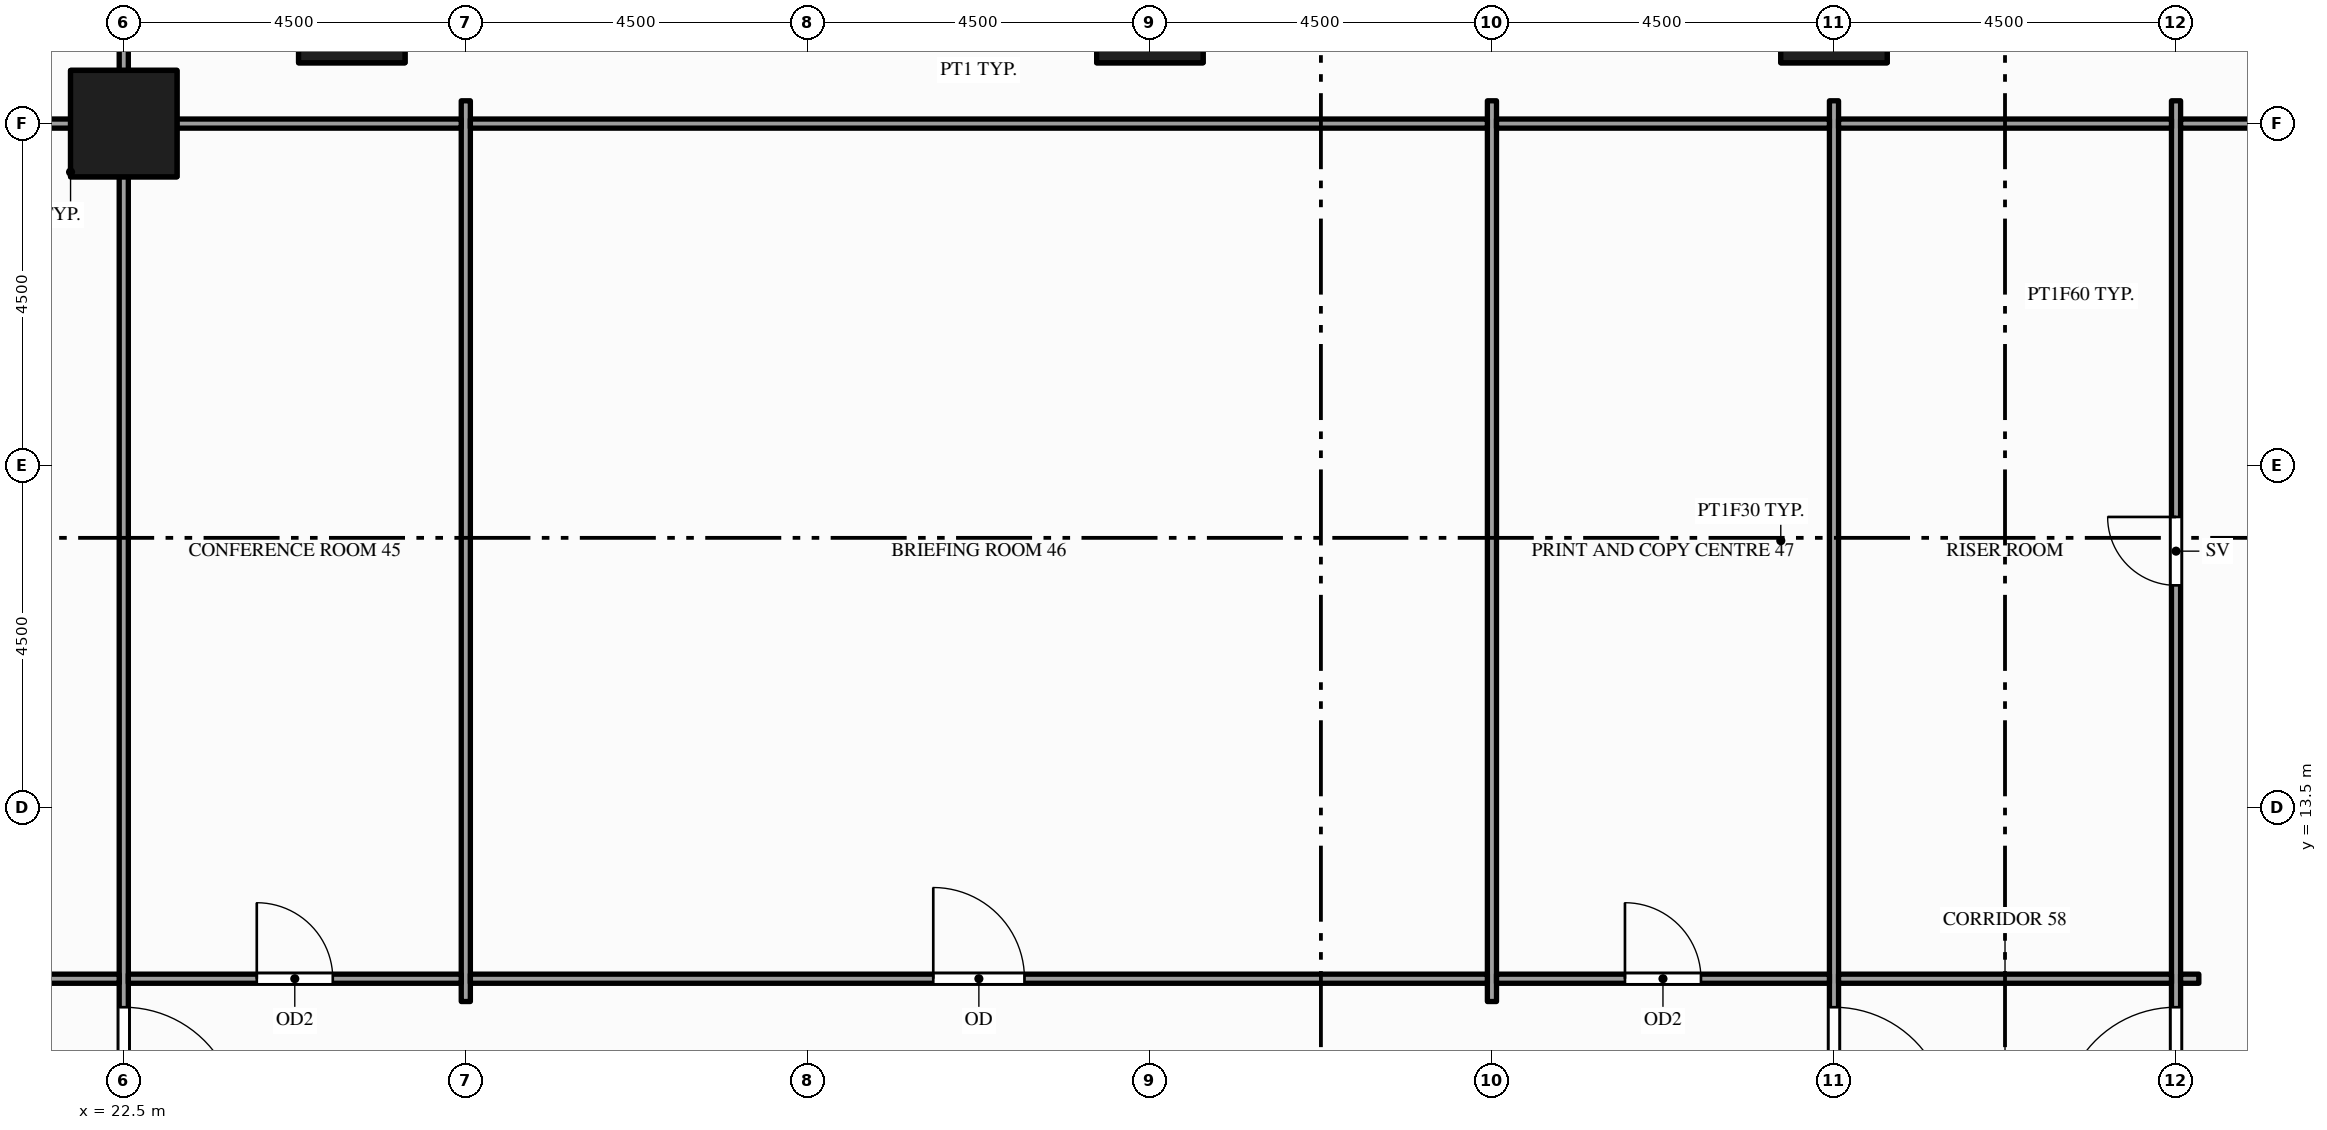
"""IFC4 building model, lengths in metres.
Left out: names, types, materials, properties, quantities, classifications, styles, units other than length and angle.
Written with IfcOpenShell. Run it as: python <this file> out.ifc"""

import sys

from ifc_helpers import new_model, si_unit, direction, frame, frame_2d, origin, origin_2d, place, context, subcontext, project, spatial, rectangle, hollow_rectangle, extrude, element, fill, save


model = new_model("IFC4")
c1 = context("Model", 3, precision=1e-05, world=origin(), true_north=direction((0.0, 1.0)))
c2 = subcontext(c1, "Body", "Model", "MODEL_VIEW")
j1 = project(units=[si_unit("LENGTHUNIT", "METRE"), si_unit("PLANEANGLEUNIT", "RADIAN")], contexts=[c1])
p1 = place(None, origin())
s1 = spatial("IfcSite", under=j1, at=p1, CompositionType="ELEMENT")
p2 = place(p1, origin())
s2 = spatial("IfcBuilding", under=s1, at=p2, CompositionType="ELEMENT")
p3 = place(p2, frame((0.0, 0.0, 24.0)))
s3 = spatial("IfcBuildingStorey", under=s2, at=p3, CompositionType="ELEMENT", Elevation=24.0)
p4 = place(p3, frame((22.5, 22.5, -0.25), z_axis=(0.0, 0.0, 1.0), x_axis=(1.0, 0.0, 0.0)))
e1 = element("IfcColumn", 1, at=p4, inside=s3, PredefinedType="COLUMN", context=c2, shape_type="SweptSolid", body=[
    extrude(hollow_rectangle(XDim=1.4, YDim=1.4, WallThickness=0.08, at=origin_2d()), origin(), (0.0, 0.0, 1.0), 3.6),
])
p5 = place(p3, frame((22.5, 22.5, 3.35), z_axis=(0.0, 0.0, 1.0), x_axis=(1.0, 0.0, 0.0)))
e2 = element("IfcColumn", 2, at=p5, inside=s3, PredefinedType="COLUMN", context=c2, shape_type="SweptSolid", body=[
    extrude(rectangle(XDim=1.4, YDim=1.4, at=origin_2d()), origin(), (0.0, 0.0, 1.0), 1.5),
])
p6 = place(p3, frame((25.5, 24.0, -0.25), z_axis=(0.0, 0.0, 1.0), x_axis=(1.0, 0.0, 0.0)))
e3 = element("IfcColumn", 3, at=p6, inside=s3, PredefinedType="COLUMN", context=c2, shape_type="SweptSolid", body=[
    extrude(hollow_rectangle(XDim=1.4, YDim=1.4, WallThickness=0.08, at=origin_2d()), origin(), (0.0, 0.0, 1.0), 3.45),
])
p7 = place(p3, frame((25.5, 24.0, 3.2), z_axis=(0.0, 0.0, 1.0), x_axis=(1.0, 0.0, 0.0)))
e4 = element("IfcColumn", 4, at=p7, inside=s3, PredefinedType="COLUMN", context=c2, shape_type="SweptSolid", body=[
    extrude(rectangle(XDim=1.4, YDim=1.4, at=origin_2d()), origin(), (0.0, 0.0, 1.0), 1.5),
])
p8 = place(p3, frame((36.0, 24.0, -0.25), z_axis=(0.0, 0.0, 1.0), x_axis=(1.0, 0.0, 0.0)))
e5 = element("IfcColumn", 5, at=p8, inside=s3, PredefinedType="COLUMN", context=c2, shape_type="SweptSolid", body=[
    extrude(hollow_rectangle(XDim=1.4, YDim=1.4, WallThickness=0.08, at=origin_2d()), origin(), (0.0, 0.0, 1.0), 3.45),
])
p9 = place(p3, frame((36.0, 24.0, 3.2), z_axis=(0.0, 0.0, 1.0), x_axis=(1.0, 0.0, 0.0)))
e6 = element("IfcColumn", 6, at=p9, inside=s3, PredefinedType="COLUMN", context=c2, shape_type="SweptSolid", body=[
    extrude(rectangle(XDim=1.4, YDim=1.4, at=origin_2d()), origin(), (0.0, 0.0, 1.0), 1.5),
])
p10 = place(p3, frame((45.0, 24.0, -0.25), z_axis=(0.0, 0.0, 1.0), x_axis=(1.0, 0.0, 0.0)))
e7 = element("IfcColumn", 7, at=p10, inside=s3, PredefinedType="COLUMN", context=c2, shape_type="SweptSolid", body=[
    extrude(hollow_rectangle(XDim=1.4, YDim=1.4, WallThickness=0.08, at=origin_2d()), origin(), (0.0, 0.0, 1.0), 3.45),
])
p11 = place(p3, frame((45.0, 24.0, 3.2), z_axis=(0.0, 0.0, 1.0), x_axis=(1.0, 0.0, 0.0)))
e8 = element("IfcColumn", 8, at=p11, inside=s3, PredefinedType="COLUMN", context=c2, shape_type="SweptSolid", body=[
    extrude(rectangle(XDim=1.4, YDim=1.4, at=origin_2d()), origin(), (0.0, 0.0, 1.0), 1.5),
])
p12 = place(p3, frame((22.5, 0.15, 0.0), z_axis=(0.0, 0.0, 1.0), x_axis=(0.0, 1.0, 0.0)))
e9 = element("IfcWall", 9, at=p12, inside=s3, PredefinedType="PARTITIONING", context=c2, shape_type="SweptSolid", body=[
    extrude(rectangle(XDim=35.95, YDim=0.12, at=frame_2d((17.975, 0.0))), origin(), (0.0, 0.0, 1.0), 3.3),
])
p13 = place(p12, frame((9.225, 0.0, 0.0)))
e10 = element("IfcOpeningElement", 10, at=p13, cuts=e9, PredefinedType="OPENING", context=c2, shape_type="SweptSolid", body=[
    extrude(rectangle(XDim=1.5, YDim=2.1, at=frame_2d((0.75, 1.05))), frame((0.0, 0.07, 0.0), z_axis=(0.0, -1.0, 0.0), x_axis=(1.0, 0.0, 0.0)), (0.0, 0.0, 1.0), 0.14),
])
p14 = place(p12, frame((32.7, 0.0, 0.0)))
e11 = element("IfcOpeningElement", 11, at=p14, cuts=e9, PredefinedType="OPENING", context=c2, shape_type="SweptSolid", body=[
    extrude(rectangle(XDim=1.8, YDim=2.1, at=frame_2d((0.9, 1.05))), frame((0.0, 0.07, 0.0), z_axis=(0.0, -1.0, 0.0), x_axis=(1.0, 0.0, 0.0)), (0.0, 0.0, 1.0), 0.14),
])
for number, where, z_axis, x_axis in (
    (12, (27.0, 10.95, 0.0), (0.0, 0.0, 1.0), (0.0, 1.0, 0.0)),
    (13, (40.5, 10.95, 0.0), (0.0, 0.0, 1.0), (0.0, 1.0, 0.0)),
):
    element("IfcWall", number, at=place(p3, frame(where, z_axis=z_axis, x_axis=x_axis)), inside=s3, PredefinedType="PARTITIONING", context=c2, shape_type="SweptSolid", body=[
        extrude(rectangle(XDim=11.85, YDim=0.12, at=frame_2d((5.925, 0.0))), origin(), (0.0, 0.0, 1.0), 3.938),
    ])
p15 = place(p3, frame((45.0, 0.15, 0.0), z_axis=(0.0, 0.0, 1.0), x_axis=(0.0, 1.0, 0.0)))
e14 = element("IfcWall", 14, at=p15, inside=s3, PredefinedType="PARTITIONING", context=c2, shape_type="SweptSolid", body=[
    extrude(rectangle(XDim=22.65, YDim=0.12, at=frame_2d((11.325, 0.0))), origin(), (0.0, 0.0, 1.0), 3.3),
])
p16 = place(p15, frame((9.225, 0.0, 0.0)))
e15 = element("IfcOpeningElement", 15, at=p16, cuts=e14, PredefinedType="OPENING", context=c2, shape_type="SweptSolid", body=[
    extrude(rectangle(XDim=1.5, YDim=2.1, at=frame_2d((0.75, 1.05))), frame((0.0, 0.07, 0.0), z_axis=(0.0, -1.0, 0.0), x_axis=(1.0, 0.0, 0.0)), (0.0, 0.0, 1.0), 0.14),
])
p17 = place(p3, frame((49.5, 0.15, 0.0), z_axis=(0.0, 0.0, 1.0), x_axis=(0.0, 1.0, 0.0)))
e16 = element("IfcWall", 16, at=p17, inside=s3, PredefinedType="PARTITIONING", context=c2, shape_type="SweptSolid", body=[
    extrude(rectangle(XDim=22.65, YDim=0.12, at=frame_2d((11.325, 0.0))), origin(), (0.0, 0.0, 1.0), 3.3),
])
p18 = place(p17, frame((0.955, 0.0, 0.0)))
e17 = element("IfcOpeningElement", 17, at=p18, cuts=e16, PredefinedType="OPENING", context=c2, shape_type="SweptSolid", body=[
    extrude(rectangle(XDim=0.9, YDim=2.1, at=frame_2d((0.45, 1.05))), frame((0.0, 0.07, 0.0), z_axis=(0.0, -1.0, 0.0), x_axis=(1.0, 0.0, 0.0)), (0.0, 0.0, 1.0), 0.14),
])
p19 = place(p17, frame((3.9, 0.0, 0.0)))
e18 = element("IfcOpeningElement", 18, at=p19, cuts=e16, PredefinedType="OPENING", context=c2, shape_type="SweptSolid", body=[
    extrude(rectangle(XDim=0.9, YDim=2.1, at=frame_2d((0.45, 1.05))), frame((0.0, 0.07, 0.0), z_axis=(0.0, -1.0, 0.0), x_axis=(1.0, 0.0, 0.0)), (0.0, 0.0, 1.0), 0.14),
])
p20 = place(p17, frame((6.85, 0.0, 0.0)))
e19 = element("IfcOpeningElement", 19, at=p20, cuts=e16, PredefinedType="OPENING", context=c2, shape_type="SweptSolid", body=[
    extrude(rectangle(XDim=1.0, YDim=2.1, at=frame_2d((0.5, 1.05))), frame((0.0, 0.07, 0.0), z_axis=(0.0, -1.0, 0.0), x_axis=(1.0, 0.0, 0.0)), (0.0, 0.0, 1.0), 0.14),
])
p21 = place(p17, frame((16.275, 0.0, 0.0)))
e20 = element("IfcOpeningElement", 20, at=p21, cuts=e16, PredefinedType="OPENING", context=c2, shape_type="SweptSolid", body=[
    extrude(rectangle(XDim=0.9, YDim=2.1, at=frame_2d((0.45, 1.05))), frame((0.0, 0.07, 0.0), z_axis=(0.0, -1.0, 0.0), x_axis=(1.0, 0.0, 0.0)), (0.0, 0.0, 1.0), 0.14),
])
p22 = place(p17, frame((9.225, 0.0, 0.0)))
e21 = element("IfcOpeningElement", 21, at=p22, cuts=e16, PredefinedType="OPENING", context=c2, shape_type="SweptSolid", body=[
    extrude(rectangle(XDim=1.5, YDim=2.1, at=frame_2d((0.75, 1.05))), frame((0.0, 0.07, 0.0), z_axis=(0.0, -1.0, 0.0), x_axis=(1.0, 0.0, 0.0)), (0.0, 0.0, 1.0), 0.14),
])
p23 = place(p3, frame((11.31, 11.25, 0.0), z_axis=(0.0, 0.0, 1.0), x_axis=(1.0, 0.0, 0.0)))
e22 = element("IfcWall", 22, at=p23, inside=s3, PredefinedType="PARTITIONING", context=c2, shape_type="SweptSolid", body=[
    extrude(rectangle(XDim=11.13, YDim=0.12, at=frame_2d((5.565, 0.0))), origin(), (0.0, 0.0, 1.0), 3.938),
])
p24 = place(p3, frame((22.56, 11.25, 0.0), z_axis=(0.0, 0.0, 1.0), x_axis=(1.0, 0.0, 0.0)))
e23 = element("IfcWall", 23, at=p24, inside=s3, PredefinedType="PARTITIONING", context=c2, shape_type="SweptSolid", body=[
    extrude(rectangle(XDim=4.38, YDim=0.12, at=frame_2d((2.19, 0.0))), origin(), (0.0, 0.0, 1.0), 3.788),
])
p25 = place(p24, frame((1.69, 0.0, 0.0)))
e24 = element("IfcOpeningElement", 24, at=p25, cuts=e23, PredefinedType="OPENING", context=c2, shape_type="SweptSolid", body=[
    extrude(rectangle(XDim=1.0, YDim=2.1, at=frame_2d((0.5, 1.05))), frame((0.0, 0.07, 0.0), z_axis=(0.0, -1.0, 0.0), x_axis=(1.0, 0.0, 0.0)), (0.0, 0.0, 1.0), 0.14),
])
p26 = place(p3, frame((27.06, 11.25, 0.0), z_axis=(0.0, 0.0, 1.0), x_axis=(1.0, 0.0, 0.0)))
e25 = element("IfcWall", 25, at=p26, inside=s3, PredefinedType="PARTITIONING", context=c2, shape_type="SweptSolid", body=[
    extrude(rectangle(XDim=13.38, YDim=0.12, at=frame_2d((6.69, 0.0))), origin(), (0.0, 0.0, 1.0), 3.938),
])
p27 = place(p26, frame((6.09, 0.0, 0.0)))
e26 = element("IfcOpeningElement", 26, at=p27, cuts=e25, PredefinedType="OPENING", context=c2, shape_type="SweptSolid", body=[
    extrude(rectangle(XDim=1.2, YDim=2.1, at=frame_2d((0.6, 1.05))), frame((0.0, 0.07, 0.0), z_axis=(0.0, -1.0, 0.0), x_axis=(1.0, 0.0, 0.0)), (0.0, 0.0, 1.0), 0.14),
])
p28 = place(p3, frame((40.56, 11.25, 0.0), z_axis=(0.0, 0.0, 1.0), x_axis=(1.0, 0.0, 0.0)))
e27 = element("IfcWall", 27, at=p28, inside=s3, PredefinedType="PARTITIONING", context=c2, shape_type="SweptSolid", body=[
    extrude(rectangle(XDim=4.38, YDim=0.12, at=frame_2d((2.19, 0.0))), origin(), (0.0, 0.0, 1.0), 3.938),
])
p29 = place(p28, frame((1.69, 0.0, 0.0)))
e28 = element("IfcOpeningElement", 28, at=p29, cuts=e27, PredefinedType="OPENING", context=c2, shape_type="SweptSolid", body=[
    extrude(rectangle(XDim=1.0, YDim=2.1, at=frame_2d((0.5, 1.05))), frame((0.0, 0.07, 0.0), z_axis=(0.0, -1.0, 0.0), x_axis=(1.0, 0.0, 0.0)), (0.0, 0.0, 1.0), 0.14),
])
p30 = place(p3, frame((45.06, 11.25, 0.0), z_axis=(0.0, 0.0, 1.0), x_axis=(1.0, 0.0, 0.0)))
e29 = element("IfcWall", 29, at=p30, inside=s3, PredefinedType="PARTITIONING", context=c2, shape_type="SweptSolid", body=[
    extrude(rectangle(XDim=4.38, YDim=0.12, at=frame_2d((2.19, 0.0))), origin(), (0.0, 0.0, 1.0), 3.938),
])
p31 = place(p3, frame((49.56, 11.25, 0.0), z_axis=(0.0, 0.0, 1.0), x_axis=(1.0, 0.0, 0.0)))
e30 = element("IfcWall", 30, at=p31, inside=s3, PredefinedType="PARTITIONING", context=c2, shape_type="SweptSolid", body=[
    extrude(rectangle(XDim=0.24, YDim=0.12, at=frame_2d((0.12, 0.0))), origin(), (0.0, 0.0, 1.0), 3.938),
])
p32 = place(p3, frame((11.31, 22.5, 0.0), z_axis=(0.0, 0.0, 1.0), x_axis=(1.0, 0.0, 0.0)))
e31 = element("IfcWall", 31, at=p32, inside=s3, PredefinedType="PARTITIONING", context=c2, shape_type="SweptSolid", body=[
    extrude(rectangle(XDim=11.13, YDim=0.12, at=frame_2d((5.565, 0.0))), origin(), (0.0, 0.0, 1.0), 3.6),
])
p33 = place(p3, frame((22.56, 22.5, 0.0), z_axis=(0.0, 0.0, 1.0), x_axis=(1.0, 0.0, 0.0)))
e32 = element("IfcWall", 32, at=p33, inside=s3, PredefinedType="PARTITIONING", context=c2, shape_type="SweptSolid", body=[
    extrude(rectangle(XDim=4.38, YDim=0.12, at=frame_2d((2.19, 0.0))), origin(), (0.0, 0.0, 1.0), 3.788),
])
p34 = place(p3, frame((27.06, 22.5, 0.0), z_axis=(0.0, 0.0, 1.0), x_axis=(1.0, 0.0, 0.0)))
e33 = element("IfcWall", 33, at=p34, inside=s3, PredefinedType="PARTITIONING", context=c2, shape_type="SweptSolid", body=[
    extrude(rectangle(XDim=13.38, YDim=0.12, at=frame_2d((6.69, 0.0))), origin(), (0.0, 0.0, 1.0), 3.938),
])
for number, where, z_axis, x_axis in (
    (34, (40.56, 22.5, 0.0), (0.0, 0.0, 1.0), (1.0, 0.0, 0.0)),
    (35, (45.06, 22.5, 0.0), (0.0, 0.0, 1.0), (1.0, 0.0, 0.0)),
):
    element("IfcWall", number, at=place(p3, frame(where, z_axis=z_axis, x_axis=x_axis)), inside=s3, PredefinedType="PARTITIONING", context=c2, shape_type="SweptSolid", body=[
        extrude(rectangle(XDim=4.38, YDim=0.12, at=frame_2d((2.19, 0.0))), origin(), (0.0, 0.0, 1.0), 3.938),
    ])
p35 = place(p3, frame((49.56, 22.5, 0.0), z_axis=(0.0, 0.0, 1.0), x_axis=(1.0, 0.0, 0.0)))
e36 = element("IfcWall", 36, at=p35, inside=s3, PredefinedType="PARTITIONING", context=c2, shape_type="SweptSolid", body=[
    extrude(rectangle(XDim=4.54, YDim=0.12, at=frame_2d((2.27, 0.0))), origin(), (0.0, 0.0, 1.0), 3.938),
])
p36 = place(p35, frame((1.29, 0.0, 0.0)))
e37 = element("IfcOpeningElement", 37, at=p36, cuts=e36, PredefinedType="OPENING", context=c2, shape_type="SweptSolid", body=[
    extrude(rectangle(XDim=1.8, YDim=2.1, at=frame_2d((0.9, 1.05))), frame((0.0, 0.07, 0.0), z_axis=(0.0, -1.0, 0.0), x_axis=(1.0, 0.0, 0.0)), (0.0, 0.0, 1.0), 0.14),
])
p37 = place(p21, origin())
e38 = element("IfcDoor", 38, at=p37, inside=s3, OperationType="SINGLE_SWING_RIGHT", PredefinedType="DOOR", context=c2, shape_type="SweptSolid", body=[
    extrude(rectangle(XDim=0.9, YDim=2.1, at=frame_2d((0.45, 1.05))), frame((0.0, 0.025, 0.0), z_axis=(0.0, -1.0, 0.0), x_axis=(1.0, 0.0, 0.0)), (0.0, 0.0, 1.0), 0.05),
])
fill(e20, e38)
p38 = place(p22, origin())
e39 = element("IfcDoor", 39, at=p38, inside=s3, OperationType="SINGLE_SWING_LEFT", PredefinedType="DOOR", context=c2, shape_type="SweptSolid", body=[
    extrude(rectangle(XDim=1.5, YDim=2.1, at=frame_2d((0.75, 1.05))), frame((0.0, 0.025, 0.0), z_axis=(0.0, -1.0, 0.0), x_axis=(1.0, 0.0, 0.0)), (0.0, 0.0, 1.0), 0.05),
])
fill(e21, e39)
p39 = place(p16, origin())
e40 = element("IfcDoor", 40, at=p39, inside=s3, OperationType="SINGLE_SWING_LEFT", PredefinedType="DOOR", context=c2, shape_type="SweptSolid", body=[
    extrude(rectangle(XDim=1.5, YDim=2.1, at=frame_2d((0.75, 1.05))), frame((0.0, 0.025, 0.0), z_axis=(0.0, -1.0, 0.0), x_axis=(1.0, 0.0, 0.0)), (0.0, 0.0, 1.0), 0.05),
])
fill(e15, e40)
p40 = place(p25, origin())
e41 = element("IfcDoor", 41, at=p40, inside=s3, OperationType="SINGLE_SWING_LEFT", PredefinedType="DOOR", context=c2, shape_type="SweptSolid", body=[
    extrude(rectangle(XDim=1.0, YDim=2.1, at=frame_2d((0.5, 1.05))), frame((0.0, 0.025, 0.0), z_axis=(0.0, -1.0, 0.0), x_axis=(1.0, 0.0, 0.0)), (0.0, 0.0, 1.0), 0.05),
])
fill(e24, e41)
p41 = place(p27, origin())
e42 = element("IfcDoor", 42, at=p41, inside=s3, OperationType="SINGLE_SWING_LEFT", PredefinedType="DOOR", context=c2, shape_type="SweptSolid", body=[
    extrude(rectangle(XDim=1.2, YDim=2.1, at=frame_2d((0.6, 1.05))), frame((0.0, 0.025, 0.0), z_axis=(0.0, -1.0, 0.0), x_axis=(1.0, 0.0, 0.0)), (0.0, 0.0, 1.0), 0.05),
])
fill(e26, e42)
p42 = place(p29, origin())
e43 = element("IfcDoor", 43, at=p42, inside=s3, OperationType="SINGLE_SWING_LEFT", PredefinedType="DOOR", context=c2, shape_type="SweptSolid", body=[
    extrude(rectangle(XDim=1.0, YDim=2.1, at=frame_2d((0.5, 1.05))), frame((0.0, 0.025, 0.0), z_axis=(0.0, -1.0, 0.0), x_axis=(1.0, 0.0, 0.0)), (0.0, 0.0, 1.0), 0.05),
])
fill(e28, e43)
p43 = place(p13, origin())
e44 = element("IfcDoor", 44, at=p43, inside=s3, OperationType="SINGLE_SWING_LEFT", PredefinedType="DOOR", context=c2, shape_type="SweptSolid", body=[
    extrude(rectangle(XDim=1.5, YDim=2.1, at=frame_2d((0.75, 1.05))), frame((0.0, 0.025, 0.0), z_axis=(0.0, -1.0, 0.0), x_axis=(1.0, 0.0, 0.0)), (0.0, 0.0, 1.0), 0.05),
])
fill(e10, e44)
save(model, sys.argv[1])
